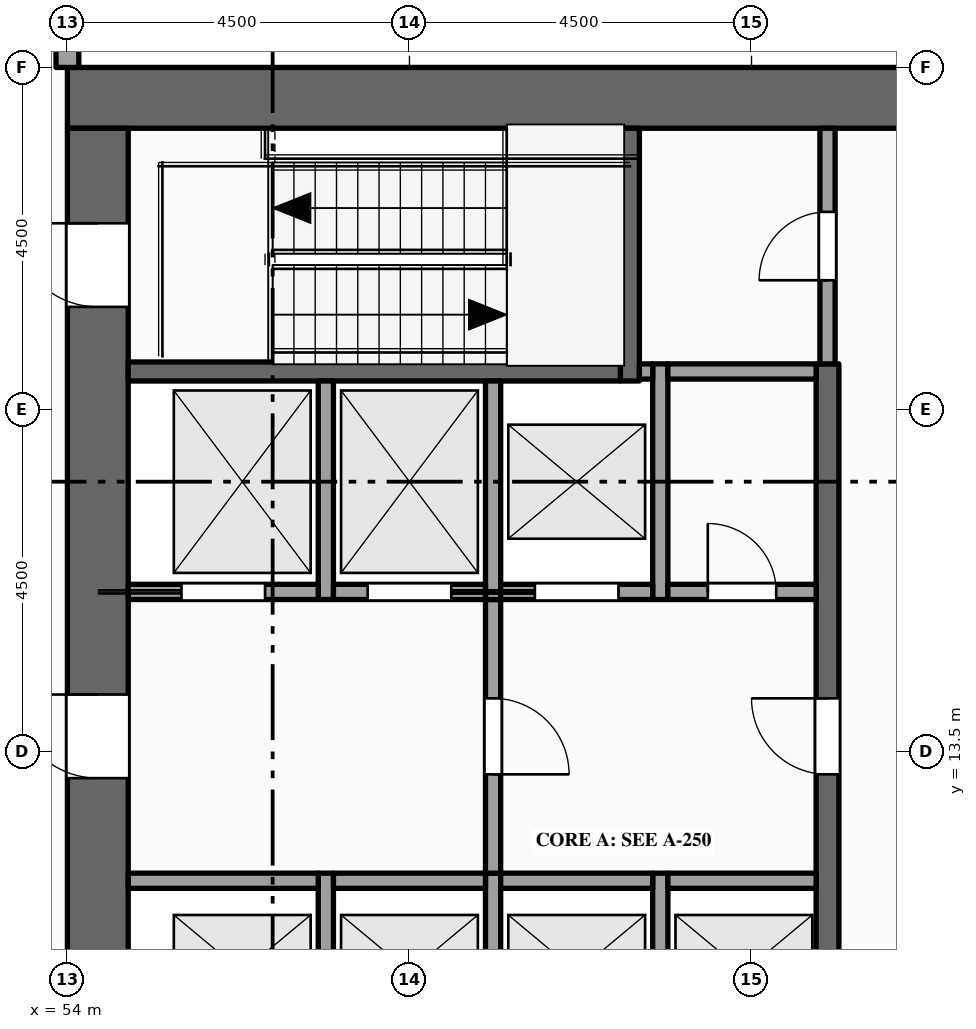
"""IFC4 building model, lengths in metres.
Left out: names, types, materials, properties, quantities, classifications, styles, units other than length and angle.
Written with IfcOpenShell. Run it as: python <this file> out.ifc"""

import sys

from ifc_helpers import new_model, si_unit, direction, frame, frame_2d, origin, place, context, subcontext, project, spatial, rectangle, extrude, element, fill, save


model = new_model("IFC4")
c1 = context("Model", 3, precision=1e-05, world=origin(), true_north=direction((0.0, 1.0)))
c2 = subcontext(c1, "Body", "Model", "MODEL_VIEW")
j1 = project(units=[si_unit("LENGTHUNIT", "METRE"), si_unit("PLANEANGLEUNIT", "RADIAN")], contexts=[c1])
p1 = place(None, origin())
s1 = spatial("IfcSite", under=j1, at=p1, CompositionType="ELEMENT")
p2 = place(p1, origin())
s2 = spatial("IfcBuilding", under=s1, at=p2, CompositionType="ELEMENT")
p3 = place(p2, frame((0.0, 0.0, 285.0)))
s3 = spatial("IfcBuildingStorey", under=s2, at=p3, CompositionType="ELEMENT", Elevation=285.0)
p4 = place(p3, frame((54.0, 22.1, -0.15), z_axis=(0.0, 0.0, 1.0), x_axis=(1.0, 0.0, 0.0)))
e1 = element("IfcWall", 1, at=p4, inside=s3, PredefinedType="SHEAR", context=c2, shape_type="SweptSolid", body=[
    extrude(rectangle(XDim=13.5, YDim=0.8, at=frame_2d((6.75, 0.0))), origin(), (0.0, 0.0, 1.0), 4.0),
])
p5 = place(p3, frame((54.4, 0.8, -0.15), z_axis=(0.0, 0.0, 1.0), x_axis=(0.0, 1.0, 0.0)))
e2 = element("IfcWall", 2, at=p5, inside=s3, PredefinedType="SHEAR", context=c2, shape_type="SweptSolid", body=[
    extrude(rectangle(XDim=20.9, YDim=0.8, at=frame_2d((10.45, 0.0))), origin(), (0.0, 0.0, 1.0), 4.0),
])
p6 = place(p5, frame((6.3, 0.0, 0.15)))
e3 = element("IfcOpeningElement", 3, at=p6, cuts=e2, PredefinedType="OPENING", context=c2, shape_type="SweptSolid", body=[
    extrude(rectangle(XDim=1.8, YDim=2.1, at=frame_2d((0.9, 1.05))), frame((0.0, 0.41, 0.0), z_axis=(0.0, -1.0, 0.0), x_axis=(1.0, 0.0, 0.0)), (0.0, 0.0, 1.0), 0.82),
])
p7 = place(p5, frame((12.35, 0.0, 0.15)))
e4 = element("IfcOpeningElement", 4, at=p7, cuts=e2, PredefinedType="OPENING", context=c2, shape_type="SweptSolid", body=[
    extrude(rectangle(XDim=1.1, YDim=2.1, at=frame_2d((0.55, 1.05))), frame((0.0, 0.41, 0.0), z_axis=(0.0, -1.0, 0.0), x_axis=(1.0, 0.0, 0.0)), (0.0, 0.0, 1.0), 0.82),
])
p8 = place(p5, frame((1.35, 0.0, 0.15)))
e5 = element("IfcOpeningElement", 5, at=p8, cuts=e2, PredefinedType="OPENING", context=c2, shape_type="SweptSolid", body=[
    extrude(rectangle(XDim=1.1, YDim=2.1, at=frame_2d((0.55, 1.05))), frame((0.0, 0.41, 0.0), z_axis=(0.0, -1.0, 0.0), x_axis=(1.0, 0.0, 0.0)), (0.0, 0.0, 1.0), 0.82),
])
p9 = place(p5, frame((18.55, 0.0, 0.15)))
e6 = element("IfcOpeningElement", 6, at=p9, cuts=e2, PredefinedType="OPENING", context=c2, shape_type="SweptSolid", body=[
    extrude(rectangle(XDim=1.1, YDim=2.1, at=frame_2d((0.55, 1.05))), frame((0.0, 0.41, 0.0), z_axis=(0.0, -1.0, 0.0), x_axis=(1.0, 0.0, 0.0)), (0.0, 0.0, 1.0), 0.82),
])
p10 = place(p3, frame((54.0, 22.5, 0.0), z_axis=(0.0, 0.0, 1.0), x_axis=(0.0, 1.0, 0.0)))
e7 = element("IfcWall", 7, at=p10, inside=s3, PredefinedType="STANDARD", context=c2, shape_type="SweptSolid", body=[
    extrude(rectangle(XDim=1.175, YDim=0.3, at=frame_2d((0.587, 0.0))), origin(), (0.0, 0.0, 1.0), 3.162),
])
p11 = place(p3, frame((57.4, 9.3, 0.0), z_axis=(0.0, 0.0, 1.0), x_axis=(0.0, 1.0, 0.0)))
e8 = element("IfcWall", 8, at=p11, inside=s3, PredefinedType="SOLIDWALL", context=c2, shape_type="SweptSolid", body=[
    extrude(rectangle(XDim=2.6, YDim=0.2, at=frame_2d((1.3, 0.0))), origin(), (0.0, 0.0, 1.0), 3.85),
])
p12 = place(p3, frame((57.4, 15.5, 0.0), z_axis=(0.0, 0.0, 1.0), x_axis=(0.0, 1.0, 0.0)))
e9 = element("IfcWall", 9, at=p12, inside=s3, PredefinedType="SOLIDWALL", context=c2, shape_type="SweptSolid", body=[
    extrude(rectangle(XDim=2.875, YDim=0.2, at=frame_2d((1.438, 0.0))), origin(), (0.0, 0.0, 1.0), 3.85),
])
p13 = place(p3, frame((59.6, 9.3, 0.0), z_axis=(0.0, 0.0, 1.0), x_axis=(0.0, 1.0, 0.0)))
e10 = element("IfcWall", 10, at=p13, inside=s3, PredefinedType="SOLIDWALL", context=c2, shape_type="SweptSolid", body=[
    extrude(rectangle(XDim=2.6, YDim=0.2, at=frame_2d((1.3, 0.0))), origin(), (0.0, 0.0, 1.0), 3.85),
])
p14 = place(p3, frame((59.6, 11.9, 0.0), z_axis=(0.0, 0.0, 1.0), x_axis=(0.0, 1.0, 0.0)))
e11 = element("IfcWall", 11, at=p14, inside=s3, PredefinedType="PARTITIONING", context=c2, shape_type="SweptSolid", body=[
    extrude(rectangle(XDim=3.6, YDim=0.2, at=frame_2d((1.8, 0.0))), origin(), (0.0, 0.0, 1.0), 3.85),
])
p15 = place(p14, frame((1.3, 0.0, 0.0)))
e12 = element("IfcOpeningElement", 12, at=p15, cuts=e11, PredefinedType="OPENING", context=c2, shape_type="SweptSolid", body=[
    extrude(rectangle(XDim=1.0, YDim=2.1, at=frame_2d((0.5, 1.05))), frame((0.0, 0.11, 0.0), z_axis=(0.0, -1.0, 0.0), x_axis=(1.0, 0.0, 0.0)), (0.0, 0.0, 1.0), 0.22),
])
p16 = place(p3, frame((59.6, 15.5, 0.0), z_axis=(0.0, 0.0, 1.0), x_axis=(0.0, 1.0, 0.0)))
e13 = element("IfcWall", 13, at=p16, inside=s3, PredefinedType="SOLIDWALL", context=c2, shape_type="SweptSolid", body=[
    extrude(rectangle(XDim=2.875, YDim=0.2, at=frame_2d((1.438, 0.0))), origin(), (0.0, 0.0, 1.0), 3.85),
])
p17 = place(p3, frame((61.4, 18.375, 0.0), z_axis=(0.0, 0.0, 1.0), x_axis=(0.0, 1.0, 0.0)))
e14 = element("IfcWall", 14, at=p17, inside=s3, PredefinedType="SHEAR", context=c2, shape_type="SweptSolid", body=[
    extrude(rectangle(XDim=3.325, YDim=0.25, at=frame_2d((1.663, 0.0))), origin(), (0.0, 0.0, 1.0), 3.85),
])
p18 = place(p3, frame((61.8, 9.3, 0.0), z_axis=(0.0, 0.0, 1.0), x_axis=(0.0, 1.0, 0.0)))
e15 = element("IfcWall", 15, at=p18, inside=s3, PredefinedType="SOLIDWALL", context=c2, shape_type="SweptSolid", body=[
    extrude(rectangle(XDim=2.6, YDim=0.2, at=frame_2d((1.3, 0.0))), origin(), (0.0, 0.0, 1.0), 3.85),
])
p19 = place(p3, frame((61.8, 15.5, 0.0), z_axis=(0.0, 0.0, 1.0), x_axis=(0.0, 1.0, 0.0)))
e16 = element("IfcWall", 16, at=p19, inside=s3, PredefinedType="SOLIDWALL", context=c2, shape_type="SweptSolid", body=[
    extrude(rectangle(XDim=3.1, YDim=0.2, at=frame_2d((1.55, 0.0))), origin(), (0.0, 0.0, 1.0), 3.85),
])
p20 = place(p3, frame((64.0, 4.1, 0.0), z_axis=(0.0, 0.0, 1.0), x_axis=(0.0, 1.0, 0.0)))
e17 = element("IfcWall", 17, at=p20, inside=s3, PredefinedType="SHEAR", context=c2, shape_type="SweptSolid", body=[
    extrude(rectangle(XDim=14.5, YDim=0.3, at=frame_2d((7.25, 0.0))), origin(), (0.0, 0.0, 1.0), 3.85),
])
p21 = place(p20, frame((3.4, 0.0, 0.0)))
e18 = element("IfcOpeningElement", 18, at=p21, cuts=e17, PredefinedType="OPENING", context=c2, shape_type="SweptSolid", body=[
    extrude(rectangle(XDim=1.0, YDim=2.1, at=frame_2d((0.5, 1.05))), frame((0.0, 0.16, 0.0), z_axis=(0.0, -1.0, 0.0), x_axis=(1.0, 0.0, 0.0)), (0.0, 0.0, 1.0), 0.32),
])
p22 = place(p20, frame((9.1, 0.0, 0.0)))
e19 = element("IfcOpeningElement", 19, at=p22, cuts=e17, PredefinedType="OPENING", context=c2, shape_type="SweptSolid", body=[
    extrude(rectangle(XDim=1.0, YDim=2.1, at=frame_2d((0.5, 1.05))), frame((0.0, 0.16, 0.0), z_axis=(0.0, -1.0, 0.0), x_axis=(1.0, 0.0, 0.0)), (0.0, 0.0, 1.0), 0.32),
])
p23 = place(p3, frame((64.0, 18.6, 0.0), z_axis=(0.0, 0.0, 1.0), x_axis=(0.0, 1.0, 0.0)))
e20 = element("IfcWall", 20, at=p23, inside=s3, PredefinedType="PARTITIONING", context=c2, shape_type="SweptSolid", body=[
    extrude(rectangle(XDim=3.1, YDim=0.2, at=frame_2d((1.55, 0.0))), origin(), (0.0, 0.0, 1.0), 3.85),
])
p24 = place(p23, frame((1.1, 0.0, 0.0)))
e21 = element("IfcOpeningElement", 21, at=p24, cuts=e20, PredefinedType="OPENING", context=c2, shape_type="SweptSolid", body=[
    extrude(rectangle(XDim=0.9, YDim=2.1, at=frame_2d((0.45, 1.05))), frame((0.0, 0.11, 0.0), z_axis=(0.0, -1.0, 0.0), x_axis=(1.0, 0.0, 0.0)), (0.0, 0.0, 1.0), 0.22),
])
p25 = place(p3, frame((54.8, 11.8, 0.0), z_axis=(0.0, 0.0, 1.0), x_axis=(1.0, 0.0, 0.0)))
e22 = element("IfcWall", 22, at=p25, inside=s3, PredefinedType="SOLIDWALL", context=c2, shape_type="SweptSolid", body=[
    extrude(rectangle(XDim=2.5, YDim=0.2, at=frame_2d((1.25, 0.0))), origin(), (0.0, 0.0, 1.0), 3.85),
])
for number, where, z_axis, x_axis in (
    (23, (57.5, 11.8, 0.0), (0.0, 0.0, 1.0), (1.0, 0.0, 0.0)),
    (24, (59.7, 11.8, 0.0), (0.0, 0.0, 1.0), (1.0, 0.0, 0.0)),
):
    element("IfcWall", number, at=place(p3, frame(where, z_axis=z_axis, x_axis=x_axis)), inside=s3, PredefinedType="SOLIDWALL", context=c2, shape_type="SweptSolid", body=[
        extrude(rectangle(XDim=2.0, YDim=0.2, at=frame_2d((1.0, 0.0))), origin(), (0.0, 0.0, 1.0), 3.85),
    ])
p26 = place(p3, frame((61.9, 11.8, 0.0), z_axis=(0.0, 0.0, 1.0), x_axis=(1.0, 0.0, 0.0)))
e25 = element("IfcWall", 25, at=p26, inside=s3, PredefinedType="SOLIDWALL", context=c2, shape_type="SweptSolid", body=[
    extrude(rectangle(XDim=1.95, YDim=0.2, at=frame_2d((0.975, 0.0))), origin(), (0.0, 0.0, 1.0), 3.85),
])
p27 = place(p3, frame((54.8, 15.6, 0.0), z_axis=(0.0, 0.0, 1.0), x_axis=(1.0, 0.0, 0.0)))
e26 = element("IfcWall", 26, at=p27, inside=s3, PredefinedType="SOLIDWALL", context=c2, shape_type="SweptSolid", body=[
    extrude(rectangle(XDim=2.5, YDim=0.2, at=frame_2d((1.25, 0.0))), origin(), (0.0, 0.0, 1.0), 3.85),
])
p28 = place(p27, frame((0.7, 0.0, 0.012)))
e27 = element("IfcOpeningElement", 27, at=p28, cuts=e26, PredefinedType="OPENING", context=c2, shape_type="SweptSolid", body=[
    extrude(rectangle(XDim=1.1, YDim=2.1, at=frame_2d((0.55, 1.05))), frame((0.0, 0.11, 0.0), z_axis=(0.0, -1.0, 0.0), x_axis=(1.0, 0.0, 0.0)), (0.0, 0.0, 1.0), 0.22),
])
p29 = place(p3, frame((57.5, 15.6, 0.0), z_axis=(0.0, 0.0, 1.0), x_axis=(1.0, 0.0, 0.0)))
e28 = element("IfcWall", 28, at=p29, inside=s3, PredefinedType="SOLIDWALL", context=c2, shape_type="SweptSolid", body=[
    extrude(rectangle(XDim=2.0, YDim=0.2, at=frame_2d((1.0, 0.0))), origin(), (0.0, 0.0, 1.0), 3.85),
])
p30 = place(p29, frame((0.45, 0.0, 0.012)))
e29 = element("IfcOpeningElement", 29, at=p30, cuts=e28, PredefinedType="OPENING", context=c2, shape_type="SweptSolid", body=[
    extrude(rectangle(XDim=1.1, YDim=2.1, at=frame_2d((0.55, 1.05))), frame((0.0, 0.11, 0.0), z_axis=(0.0, -1.0, 0.0), x_axis=(1.0, 0.0, 0.0)), (0.0, 0.0, 1.0), 0.22),
])
p31 = place(p3, frame((59.7, 15.6, 0.0), z_axis=(0.0, 0.0, 1.0), x_axis=(1.0, 0.0, 0.0)))
e30 = element("IfcWall", 30, at=p31, inside=s3, PredefinedType="SOLIDWALL", context=c2, shape_type="SweptSolid", body=[
    extrude(rectangle(XDim=2.0, YDim=0.2, at=frame_2d((1.0, 0.0))), origin(), (0.0, 0.0, 1.0), 3.85),
])
p32 = place(p31, frame((0.45, 0.0, 0.012)))
e31 = element("IfcOpeningElement", 31, at=p32, cuts=e30, PredefinedType="OPENING", context=c2, shape_type="SweptSolid", body=[
    extrude(rectangle(XDim=1.1, YDim=2.1, at=frame_2d((0.55, 1.05))), frame((0.0, 0.11, 0.0), z_axis=(0.0, -1.0, 0.0), x_axis=(1.0, 0.0, 0.0)), (0.0, 0.0, 1.0), 0.22),
])
p33 = place(p3, frame((61.9, 15.6, 0.0), z_axis=(0.0, 0.0, 1.0), x_axis=(1.0, 0.0, 0.0)))
e32 = element("IfcWall", 32, at=p33, inside=s3, PredefinedType="PARTITIONING", context=c2, shape_type="SweptSolid", body=[
    extrude(rectangle(XDim=1.95, YDim=0.2, at=frame_2d((0.975, 0.0))), origin(), (0.0, 0.0, 1.0), 3.85),
])
p34 = place(p33, frame((0.525, 0.0, 0.0)))
e33 = element("IfcOpeningElement", 33, at=p34, cuts=e32, PredefinedType="OPENING", context=c2, shape_type="SweptSolid", body=[
    extrude(rectangle(XDim=0.9, YDim=2.1, at=frame_2d((0.45, 1.05))), frame((0.0, 0.11, 0.0), z_axis=(0.0, -1.0, 0.0), x_axis=(1.0, 0.0, 0.0)), (0.0, 0.0, 1.0), 0.22),
])
p35 = place(p3, frame((54.8, 18.5, 0.0), z_axis=(0.0, 0.0, 1.0), x_axis=(1.0, 0.0, 0.0)))
e34 = element("IfcWall", 34, at=p35, inside=s3, PredefinedType="SHEAR", context=c2, shape_type="SweptSolid", body=[
    extrude(rectangle(XDim=6.475, YDim=0.25, at=frame_2d((3.237, 0.0))), origin(), (0.0, 0.0, 1.0), 3.85),
])
p36 = place(p3, frame((61.525, 18.5, 0.0), z_axis=(0.0, 0.0, 1.0), x_axis=(1.0, 0.0, 0.0)))
e35 = element("IfcWall", 35, at=p36, inside=s3, PredefinedType="SOLIDWALL", context=c2, shape_type="SweptSolid", body=[
    extrude(rectangle(XDim=0.175, YDim=0.2, at=frame_2d((0.087, 0.0))), origin(), (0.0, 0.0, 1.0), 3.85),
])
p37 = place(p3, frame((61.9, 18.5, 0.0), z_axis=(0.0, 0.0, 1.0), x_axis=(1.0, 0.0, 0.0)))
e36 = element("IfcWall", 36, at=p37, inside=s3, PredefinedType="PARTITIONING", context=c2, shape_type="SweptSolid", body=[
    extrude(rectangle(XDim=1.95, YDim=0.2, at=frame_2d((0.975, 0.0))), origin(), (0.0, 0.0, 1.0), 3.85),
])
p38 = place(p28, origin())
e37 = element("IfcDoor", 37, at=p38, inside=s3, OperationType="SLIDING_TO_LEFT", PredefinedType="DOOR", context=c2, shape_type="SweptSolid", body=[
    extrude(rectangle(XDim=1.1, YDim=2.1, at=frame_2d((0.55, 1.05))), frame((0.0, 0.025, 0.0), z_axis=(0.0, -1.0, 0.0), x_axis=(1.0, 0.0, 0.0)), (0.0, 0.0, 1.0), 0.05),
])
fill(e27, e37)
p39 = place(p30, origin())
e38 = element("IfcDoor", 38, at=p39, inside=s3, OperationType="SLIDING_TO_RIGHT", PredefinedType="DOOR", context=c2, shape_type="SweptSolid", body=[
    extrude(rectangle(XDim=1.1, YDim=2.1, at=frame_2d((0.55, 1.05))), frame((0.0, 0.025, 0.0), z_axis=(0.0, -1.0, 0.0), x_axis=(1.0, 0.0, 0.0)), (0.0, 0.0, 1.0), 0.05),
])
fill(e29, e38)
p40 = place(p32, origin())
e39 = element("IfcDoor", 39, at=p40, inside=s3, OperationType="SLIDING_TO_LEFT", PredefinedType="DOOR", context=c2, shape_type="SweptSolid", body=[
    extrude(rectangle(XDim=1.1, YDim=2.1, at=frame_2d((0.55, 1.05))), frame((0.0, 0.025, 0.0), z_axis=(0.0, -1.0, 0.0), x_axis=(1.0, 0.0, 0.0)), (0.0, 0.0, 1.0), 0.05),
])
fill(e31, e39)
p41 = place(p7, origin())
e40 = element("IfcDoor", 40, at=p41, inside=s3, OperationType="SINGLE_SWING_RIGHT", PredefinedType="DOOR", context=c2, shape_type="SweptSolid", body=[
    extrude(rectangle(XDim=1.1, YDim=2.1, at=frame_2d((0.55, 1.05))), frame((0.0, 0.025, 0.0), z_axis=(0.0, -1.0, 0.0), x_axis=(1.0, 0.0, 0.0)), (0.0, 0.0, 1.0), 0.05),
])
fill(e4, e40)
p42 = place(p15, origin())
e41 = element("IfcDoor", 41, at=p42, inside=s3, OperationType="SINGLE_SWING_LEFT", PredefinedType="DOOR", context=c2, shape_type="SweptSolid", body=[
    extrude(rectangle(XDim=1.0, YDim=2.1, at=frame_2d((0.5, 1.05))), frame((0.0, 0.025, 0.0), z_axis=(0.0, -1.0, 0.0), x_axis=(1.0, 0.0, 0.0)), (0.0, 0.0, 1.0), 0.05),
])
fill(e12, e41)
p43 = place(p22, origin())
e42 = element("IfcDoor", 42, at=p43, inside=s3, OperationType="SINGLE_SWING_RIGHT", PredefinedType="DOOR", context=c2, shape_type="SweptSolid", body=[
    extrude(rectangle(XDim=1.0, YDim=2.1, at=frame_2d((0.5, 1.05))), frame((0.0, 0.025, 0.0), z_axis=(0.0, -1.0, 0.0), x_axis=(1.0, 0.0, 0.0)), (0.0, 0.0, 1.0), 0.05),
])
fill(e19, e42)
p44 = place(p9, origin())
e43 = element("IfcDoor", 43, at=p44, inside=s3, OperationType="SINGLE_SWING_RIGHT", PredefinedType="DOOR", context=c2, shape_type="SweptSolid", body=[
    extrude(rectangle(XDim=1.1, YDim=2.1, at=frame_2d((0.55, 1.05))), frame((0.0, 0.025, 0.0), z_axis=(0.0, -1.0, 0.0), x_axis=(1.0, 0.0, 0.0)), (0.0, 0.0, 1.0), 0.05),
])
fill(e6, e43)
p45 = place(p24, origin())
e44 = element("IfcDoor", 44, at=p45, inside=s3, OperationType="SINGLE_SWING_LEFT", PredefinedType="DOOR", context=c2, shape_type="SweptSolid", body=[
    extrude(rectangle(XDim=0.9, YDim=2.1, at=frame_2d((0.45, 1.05))), frame((0.0, 0.025, 0.0), z_axis=(0.0, -1.0, 0.0), x_axis=(1.0, 0.0, 0.0)), (0.0, 0.0, 1.0), 0.05),
])
fill(e21, e44)
p46 = place(p34, origin())
e45 = element("IfcDoor", 45, at=p46, inside=s3, OperationType="SINGLE_SWING_LEFT", PredefinedType="DOOR", context=c2, shape_type="SweptSolid", body=[
    extrude(rectangle(XDim=0.9, YDim=2.1, at=frame_2d((0.45, 1.05))), frame((0.0, 0.025, 0.0), z_axis=(0.0, -1.0, 0.0), x_axis=(1.0, 0.0, 0.0)), (0.0, 0.0, 1.0), 0.05),
])
fill(e33, e45)
save(model, sys.argv[1])
